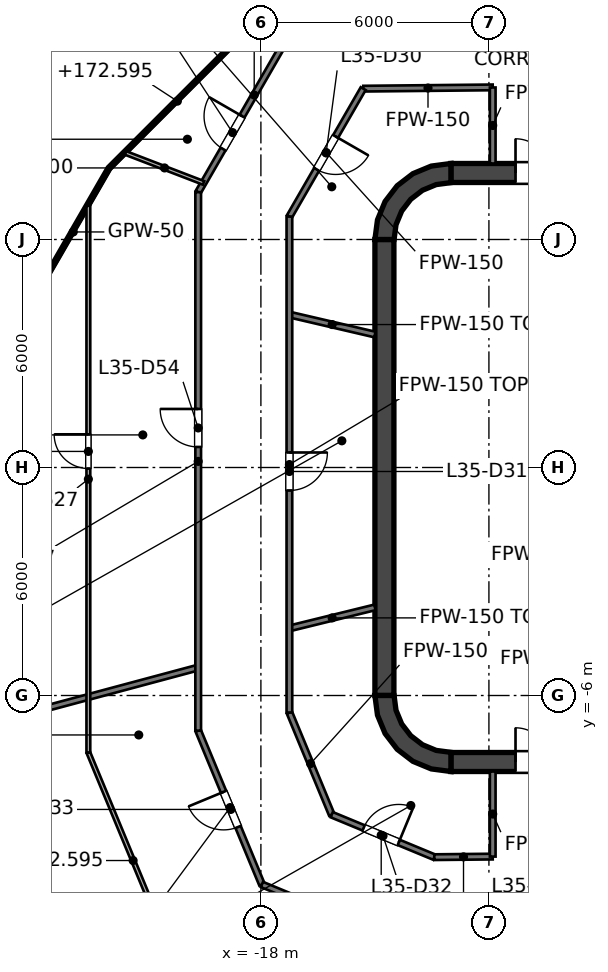
"""IFC4 building model, lengths in metres.
Left out: names, types, materials, properties, quantities, classifications, styles, units other than length and angle.
Written with IfcOpenShell. Run it as: python <this file> out.ifc"""

import sys

from ifc_helpers import new_model, si_unit, direction, frame, frame_2d, origin, place, context, subcontext, project, spatial, polyline, rectangle, outline, extrude, element, fill, save


model = new_model("IFC4")
c1 = context("Model", 3, precision=1e-05, world=origin(), true_north=direction((0.0, 1.0)))
c2 = subcontext(c1, "Body", "Model", "MODEL_VIEW")
j1 = project(units=[si_unit("LENGTHUNIT", "METRE"), si_unit("PLANEANGLEUNIT", "RADIAN")], contexts=[c1])
p1 = place(None, origin())
s1 = spatial("IfcSite", under=j1, at=p1, CompositionType="ELEMENT")
p2 = place(p1, origin())
s2 = spatial("IfcBuilding", under=s1, at=p2, CompositionType="ELEMENT")
p3 = place(p2, frame((0.0, 0.0, 169.6)))
s3 = spatial("IfcBuildingStorey", under=s2, at=p3, CompositionType="ELEMENT", Elevation=169.6)
p4 = place(p3, frame((-13.0, 7.75, 0.0), z_axis=(0.0, 0.0, 1.0), x_axis=(1.0, 0.0, 0.0)))
e1 = element("IfcWall", 1, at=p4, inside=s3, PredefinedType="SHEAR", context=c2, shape_type="SweptSolid", body=[
    extrude(rectangle(XDim=26.0, YDim=0.5, at=frame_2d((13.0, 0.0))), origin(), (0.0, 0.0, 1.0), 4.0),
])
p5 = place(p4, frame((1.7, 0.0, 0.0)))
e2 = element("IfcOpeningElement", 2, at=p5, cuts=e1, PredefinedType="OPENING", context=c2, shape_type="SweptSolid", body=[
    extrude(rectangle(XDim=1.8, YDim=2.1, at=frame_2d((0.9, 1.05))), frame((0.0, 0.25, 0.0), z_axis=(0.0, -1.0, 0.0), x_axis=(1.0, 0.0, 0.0)), (0.0, 0.0, 1.0), 0.5),
])
p6 = place(p4, frame((22.5, 0.0, 0.0)))
e3 = element("IfcOpeningElement", 3, at=p6, cuts=e1, PredefinedType="OPENING", context=c2, shape_type="SweptSolid", body=[
    extrude(rectangle(XDim=1.8, YDim=2.1, at=frame_2d((0.9, 1.05))), frame((0.0, 0.25, 0.0), z_axis=(0.0, -1.0, 0.0), x_axis=(1.0, 0.0, 0.0)), (0.0, 0.0, 1.0), 0.5),
])
p7 = place(p3, frame((-13.0, -7.75, 0.0), z_axis=(0.0, 0.0, 1.0), x_axis=(1.0, 0.0, 0.0)))
e4 = element("IfcWall", 4, at=p7, inside=s3, PredefinedType="SHEAR", context=c2, shape_type="SweptSolid", body=[
    extrude(rectangle(XDim=26.0, YDim=0.5, at=frame_2d((13.0, 0.0))), origin(), (0.0, 0.0, 1.0), 4.0),
])
p8 = place(p7, frame((1.7, 0.0, 0.0)))
e5 = element("IfcOpeningElement", 5, at=p8, cuts=e4, PredefinedType="OPENING", context=c2, shape_type="SweptSolid", body=[
    extrude(rectangle(XDim=1.8, YDim=2.1, at=frame_2d((0.9, 1.05))), frame((0.0, 0.25, 0.0), z_axis=(0.0, -1.0, 0.0), x_axis=(1.0, 0.0, 0.0)), (0.0, 0.0, 1.0), 0.5),
])
p9 = place(p7, frame((22.5, 0.0, 0.0)))
e6 = element("IfcOpeningElement", 6, at=p9, cuts=e4, PredefinedType="OPENING", context=c2, shape_type="SweptSolid", body=[
    extrude(rectangle(XDim=1.8, YDim=2.1, at=frame_2d((0.9, 1.05))), frame((0.0, 0.25, 0.0), z_axis=(0.0, -1.0, 0.0), x_axis=(1.0, 0.0, 0.0)), (0.0, 0.0, 1.0), 0.5),
])
p10 = place(p3, frame((-14.75, -6.0, 0.0), z_axis=(0.0, 0.0, 1.0), x_axis=(0.0, 1.0, 0.0)))
e7 = element("IfcWall", 7, at=p10, inside=s3, PredefinedType="SHEAR", context=c2, shape_type="SweptSolid", body=[
    extrude(rectangle(XDim=12.0, YDim=0.5, at=frame_2d((6.0, 0.0))), origin(), (0.0, 0.0, 1.0), 4.0),
])
p11 = place(p3, origin())
e8 = element("IfcWall", 8, at=p11, inside=s3, PredefinedType="SHEAR", context=c2, shape_type="SweptSolid", body=[
    extrude(outline(polyline([(-15.0, 6.0), (-14.496, 6.0), (-14.445, 6.387), (-14.295, 6.748), (-14.058, 7.058), (-13.748, 7.295), (-13.387, 7.445), (-13.0, 7.496), (-13.0, 8.0), (-13.518, 7.932), (-14.0, 7.732), (-14.414, 7.414), (-14.732, 7.0), (-14.932, 6.518), (-15.0, 6.0)])), origin(), (0.0, 0.0, 1.0), 4.0),
])
e9 = element("IfcWall", 9, at=p11, inside=s3, PredefinedType="SHEAR", context=c2, shape_type="SweptSolid", body=[
    extrude(outline(polyline([(-13.0, -8.0), (-13.0, -7.496), (-13.387, -7.445), (-13.748, -7.295), (-14.058, -7.058), (-14.295, -6.748), (-14.445, -6.387), (-14.496, -6.0), (-15.0, -6.0), (-14.932, -6.518), (-14.732, -7.0), (-14.414, -7.414), (-14.0, -7.732), (-13.518, -7.932), (-13.0, -8.0)])), origin(), (0.0, 0.0, 1.0), 4.0),
])
p12 = place(p3, frame((-11.8, -7.5, 0.0), z_axis=(0.0, 0.0, 1.0), x_axis=(0.0, 1.0, 0.0)))
e10 = element("IfcWall", 10, at=p12, inside=s3, PredefinedType="SOLIDWALL", context=c2, shape_type="SweptSolid", body=[
    extrude(rectangle(XDim=15.0, YDim=0.4, at=frame_2d((7.5, 0.0))), origin(), (0.0, 0.0, 1.0), 3.85),
])
p13 = place(p12, frame((11.3, 0.0, 0.0)))
e11 = element("IfcOpeningElement", 11, at=p13, cuts=e10, PredefinedType="OPENING", context=c2, shape_type="SweptSolid", body=[
    extrude(rectangle(XDim=1.1, YDim=2.1, at=frame_2d((0.55, 1.05))), frame((0.0, 0.2, 0.0), z_axis=(0.0, -1.0, 0.0), x_axis=(1.0, 0.0, 0.0)), (0.0, 0.0, 1.0), 0.4),
])
p14 = place(p12, frame((8.4, 0.0, 0.0)))
e12 = element("IfcOpeningElement", 12, at=p14, cuts=e10, PredefinedType="OPENING", context=c2, shape_type="SweptSolid", body=[
    extrude(rectangle(XDim=1.1, YDim=2.1, at=frame_2d((0.55, 1.05))), frame((0.0, 0.2, 0.0), z_axis=(0.0, -1.0, 0.0), x_axis=(1.0, 0.0, 0.0)), (0.0, 0.0, 1.0), 0.4),
])
p15 = place(p12, frame((5.5, 0.0, 0.0)))
e13 = element("IfcOpeningElement", 13, at=p15, cuts=e10, PredefinedType="OPENING", context=c2, shape_type="SweptSolid", body=[
    extrude(rectangle(XDim=1.1, YDim=2.1, at=frame_2d((0.55, 1.05))), frame((0.0, 0.2, 0.0), z_axis=(0.0, -1.0, 0.0), x_axis=(1.0, 0.0, 0.0)), (0.0, 0.0, 1.0), 0.4),
])
p16 = place(p12, frame((13.697, 0.0, 0.0)))
e14 = element("IfcOpeningElement", 14, at=p16, cuts=e10, PredefinedType="OPENING", context=c2, shape_type="SweptSolid", body=[
    extrude(rectangle(XDim=0.9, YDim=2.1, at=frame_2d((0.45, 1.05))), frame((0.0, 0.2, 0.0), z_axis=(0.0, -1.0, 0.0), x_axis=(1.0, 0.0, 0.0)), (0.0, 0.0, 1.0), 0.4),
])
p17 = place(p12, frame((0.403, 0.0, 0.0)))
e15 = element("IfcOpeningElement", 15, at=p17, cuts=e10, PredefinedType="OPENING", context=c2, shape_type="SweptSolid", body=[
    extrude(rectangle(XDim=0.9, YDim=2.1, at=frame_2d((0.45, 1.05))), frame((0.0, 0.2, 0.0), z_axis=(0.0, -1.0, 0.0), x_axis=(1.0, 0.0, 0.0)), (0.0, 0.0, 1.0), 0.4),
])
e16 = element("IfcWall", 16, at=p11, inside=s3, PredefinedType="SOLIDWALL", context=c2, shape_type="SweptSolid", body=[
    extrude(outline(polyline([(-12.0, -5.925), (-12.0, -5.675), (-14.25, -5.675), (-14.25, -3.025), (-12.0, -3.025), (-12.0, -2.775), (-14.25, -2.775), (-14.25, -0.125), (-12.0, -0.125), (-12.0, 0.125), (-14.25, 0.125), (-14.25, 2.775), (-12.0, 2.775), (-12.0, 3.025), (-14.25, 3.025), (-14.25, 5.675), (-12.0, 5.675), (-12.0, 5.925), (-14.25, 5.925), (-14.5, 5.925), (-14.5, 5.675), (-14.5, 3.025), (-14.5, 2.775), (-14.5, 0.125), (-14.5, -0.125), (-14.5, -2.775), (-14.5, -3.025), (-14.5, -5.675), (-14.5, -5.925), (-14.25, -5.925), (-12.0, -5.925)])), origin(), (0.0, 0.0, 1.0), 3.85),
])
p18 = place(p3, frame((-19.65, -6.925, 0.0), z_axis=(0.0, 0.0, 1.0), x_axis=(0.38279467838, -0.923833445056, 0.0)))
e17 = element("IfcWall", 17, at=p18, inside=s3, PredefinedType="PARTITIONING", context=c2, shape_type="SweptSolid", body=[
    extrude(rectangle(XDim=4.382, YDim=0.15, at=frame_2d((2.191, 0.0))), origin(), (0.0, 0.0, 1.0), 2.995),
])
p19 = place(p18, frame((1.744, 0.0, 0.0)))
e18 = element("IfcOpeningElement", 18, at=p19, cuts=e17, PredefinedType="OPENING", context=c2, shape_type="SweptSolid", body=[
    extrude(rectangle(XDim=1.0, YDim=2.1, at=frame_2d((0.5, 1.05))), frame((0.0, 0.075, 0.0), z_axis=(0.0, -1.0, 0.0), x_axis=(1.0, 0.0, 0.0)), (0.0, 0.0, 1.0), 0.15),
])
p20 = place(p3, frame((-17.25, -6.448, 0.0), z_axis=(0.0, 0.0, 1.0), x_axis=(0.382791482122, -0.923834769434, 0.0)))
e19 = element("IfcWall", 19, at=p20, inside=s3, PredefinedType="PARTITIONING", context=c2, shape_type="SweptSolid", body=[
    extrude(rectangle(XDim=2.91, YDim=0.15, at=frame_2d((1.455, 0.0))), origin(), (0.0, 0.0, 1.0), 2.995),
])
p21 = place(p3, frame((-17.973, -10.973, 0.0), z_axis=(0.0, 0.0, 1.0), x_axis=(0.923858763081, -0.382733570356, 0.0)))
e20 = element("IfcWall", 20, at=p21, inside=s3, PredefinedType="PARTITIONING", context=c2, shape_type="SweptSolid", body=[
    extrude(rectangle(XDim=4.405, YDim=0.15, at=frame_2d((2.203, 0.0))), origin(), (0.0, 0.0, 1.0), 2.995),
])
p22 = place(p3, frame((-16.136, -9.136, 0.0), z_axis=(0.0, 0.0, 1.0), x_axis=(0.923883401113, -0.3826740926, 0.0)))
e21 = element("IfcWall", 21, at=p22, inside=s3, PredefinedType="PARTITIONING", context=c2, shape_type="SweptSolid", body=[
    extrude(rectangle(XDim=2.921, YDim=0.15, at=frame_2d((1.461, 0.0))), origin(), (0.0, 0.0, 1.0), 2.995),
])
p23 = place(p22, frame((0.909, 0.0, 0.0)))
e22 = element("IfcOpeningElement", 22, at=p23, cuts=e21, PredefinedType="OPENING", context=c2, shape_type="SweptSolid", body=[
    extrude(rectangle(XDim=1.0, YDim=2.1, at=frame_2d((0.5, 1.05))), frame((0.0, 0.075, 0.0), z_axis=(0.0, -1.0, 0.0), x_axis=(1.0, 0.0, 0.0)), (0.0, 0.0, 1.0), 0.15),
])
p24 = place(p3, frame((-17.25, 4.024, 0.0), z_axis=(0.0, 0.0, 1.0), x_axis=(0.973873936825, -0.227089311007, 0.0)))
e23 = element("IfcWall", 23, at=p24, inside=s3, PredefinedType="PARTITIONING", context=c2, shape_type="SweptSolid", body=[
    extrude(rectangle(XDim=2.31, YDim=0.15, at=frame_2d((1.155, 0.0))), origin(), (0.0, 0.0, 1.0), 2.927),
])
p25 = place(p3, frame((-13.437, -10.254, 0.0), z_axis=(0.0, 0.0, 1.0), x_axis=(0.999951516679, 0.009847044796, 0.0)))
e24 = element("IfcWall", 24, at=p25, inside=s3, PredefinedType="PARTITIONING", context=c2, shape_type="SweptSolid", body=[
    extrude(rectangle(XDim=1.537, YDim=0.15, at=frame_2d((0.769, 0.0))), origin(), (0.0, 0.0, 1.0), 3.85),
])
p26 = place(p3, frame((-15.306, 9.969, 0.0), z_axis=(0.0, 0.0, 1.0), x_axis=(0.999951080092, 0.009891280127, 0.0)))
e25 = element("IfcWall", 25, at=p26, inside=s3, PredefinedType="PARTITIONING", context=c2, shape_type="SweptSolid", body=[
    extrude(rectangle(XDim=3.406, YDim=0.15, at=frame_2d((1.703, 0.0))), origin(), (0.0, 0.0, 1.0), 2.995),
])
p27 = place(p3, frame((-17.25, -4.234, 0.0), z_axis=(0.0, 0.0, 1.0), x_axis=(0.971126143966, 0.238566578769, 0.0)))
e26 = element("IfcWall", 26, at=p27, inside=s3, PredefinedType="PARTITIONING", context=c2, shape_type="SweptSolid", body=[
    extrude(rectangle(XDim=2.317, YDim=0.15, at=frame_2d((1.158, 0.0))), origin(), (0.0, 0.0, 1.0), 2.927),
])
p28 = place(p3, frame((-29.463, -7.895, 0.0), z_axis=(0.0, 0.0, 1.0), x_axis=(0.965899878732, 0.258915863296, 0.0)))
e27 = element("IfcWall", 27, at=p28, inside=s3, PredefinedType="PARTITIONING", context=c2, shape_type="SweptSolid", body=[
    extrude(rectangle(XDim=10.159, YDim=0.15, at=frame_2d((5.08, 0.0))), origin(), (0.0, 0.0, 1.0), 3.527),
])
p29 = place(p3, frame((-17.25, 6.603, 0.0), z_axis=(0.0, 0.0, 1.0), x_axis=(0.499659014053, 0.866222182627, 0.0)))
e28 = element("IfcWall", 28, at=p29, inside=s3, PredefinedType="PARTITIONING", context=c2, shape_type="SweptSolid", body=[
    extrude(rectangle(XDim=3.887, YDim=0.15, at=frame_2d((1.943, 0.0))), origin(), (0.0, 0.0, 1.0), 2.995),
])
p30 = place(p29, frame((1.434, 0.0, 0.0)))
e29 = element("IfcOpeningElement", 29, at=p30, cuts=e28, PredefinedType="OPENING", context=c2, shape_type="SweptSolid", body=[
    extrude(rectangle(XDim=1.0, YDim=2.1, at=frame_2d((0.5, 1.05))), frame((0.0, 0.075, 0.0), z_axis=(0.0, -1.0, 0.0), x_axis=(1.0, 0.0, 0.0)), (0.0, 0.0, 1.0), 0.15),
])
p31 = place(p3, frame((-19.65, 7.246, 0.0), z_axis=(0.0, 0.0, 1.0), x_axis=(0.499673489744, 0.866213832519, 0.0)))
e30 = element("IfcWall", 30, at=p31, inside=s3, PredefinedType="PARTITIONING", context=c2, shape_type="SweptSolid", body=[
    extrude(rectangle(XDim=5.899, YDim=0.15, at=frame_2d((2.95, 0.0))), origin(), (0.0, 0.0, 1.0), 2.995),
])
p32 = place(p31, frame((1.31, 0.0, 0.0)))
e31 = element("IfcOpeningElement", 31, at=p32, cuts=e30, PredefinedType="OPENING", context=c2, shape_type="SweptSolid", body=[
    extrude(rectangle(XDim=1.0, YDim=2.1, at=frame_2d((0.5, 1.05))), frame((0.0, 0.075, 0.0), z_axis=(0.0, -1.0, 0.0), x_axis=(1.0, 0.0, 0.0)), (0.0, 0.0, 1.0), 0.15),
])
p33 = place(p3, frame((-11.9, -10.239, 0.0), z_axis=(0.0, 0.0, 1.0), x_axis=(0.0, 1.0, 0.0)))
e32 = element("IfcWall", 32, at=p33, inside=s3, PredefinedType="PARTITIONING", context=c2, shape_type="SweptSolid", body=[
    extrude(rectangle(XDim=2.239, YDim=0.15, at=frame_2d((1.12, 0.0))), origin(), (0.0, 0.0, 1.0), 2.995),
])
p34 = place(p3, frame((-11.9, 8.0, 0.0), z_axis=(0.0, 0.0, 1.0), x_axis=(0.0, 1.0, 0.0)))
e33 = element("IfcWall", 33, at=p34, inside=s3, PredefinedType="PARTITIONING", context=c2, shape_type="SweptSolid", body=[
    extrude(rectangle(XDim=2.0, YDim=0.15, at=frame_2d((1.0, 0.0))), origin(), (0.0, 0.0, 1.0), 2.995),
])
p35 = place(p3, frame((-17.25, -6.448, 0.0), z_axis=(0.0, 0.0, 1.0), x_axis=(0.0, 1.0, 0.0)))
e34 = element("IfcWall", 34, at=p35, inside=s3, PredefinedType="PARTITIONING", context=c2, shape_type="SweptSolid", body=[
    extrude(rectangle(XDim=13.051, YDim=0.15, at=frame_2d((6.525, 0.0))), origin(), (0.0, 0.0, 1.0), 2.927),
])
p36 = place(p35, frame((5.843, 0.0, 0.0)))
e35 = element("IfcOpeningElement", 35, at=p36, cuts=e34, PredefinedType="OPENING", context=c2, shape_type="SweptSolid", body=[
    extrude(rectangle(XDim=1.0, YDim=2.1, at=frame_2d((0.5, 1.05))), frame((0.0, 0.075, 0.0), z_axis=(0.0, -1.0, 0.0), x_axis=(1.0, 0.0, 0.0)), (0.0, 0.0, 1.0), 0.15),
])
p37 = place(p3, frame((-19.65, -6.925, 0.0), z_axis=(0.0, 0.0, 1.0), x_axis=(0.0, 1.0, 0.0)))
e36 = element("IfcWall", 36, at=p37, inside=s3, PredefinedType="PARTITIONING", context=c2, shape_type="SweptSolid", body=[
    extrude(rectangle(XDim=14.171, YDim=0.15, at=frame_2d((7.085, 0.0))), origin(), (0.0, 0.0, 1.0), 2.927),
])
p38 = place(p37, frame((7.466, 0.0, 0.0)))
e37 = element("IfcOpeningElement", 37, at=p38, cuts=e36, PredefinedType="OPENING", context=c2, shape_type="SweptSolid", body=[
    extrude(rectangle(XDim=1.0, YDim=2.1, at=frame_2d((0.5, 1.05))), frame((0.0, 0.075, 0.0), z_axis=(0.0, -1.0, 0.0), x_axis=(1.0, 0.0, 0.0)), (0.0, 0.0, 1.0), 0.15),
])
p39 = place(p3, frame((-21.977, 7.861, 0.0), z_axis=(0.0, 0.0, 1.0), x_axis=(0.70713104079, 0.707082520751, 0.0)))
e38 = element("IfcWall", 38, at=p39, inside=s3, PredefinedType="PARTITIONING", context=c2, shape_type="SweptSolid", body=[
    extrude(rectangle(XDim=5.032, YDim=0.05, at=frame_2d((2.516, 0.0))), origin(), (0.0, 0.0, 1.0), 2.995),
])
p40 = place(p3, frame((-23.897, 4.536, 0.0), z_axis=(0.0, 0.0, 1.0), x_axis=(0.500023335103, 0.866011930837, 0.0)))
e39 = element("IfcWall", 39, at=p40, inside=s3, PredefinedType="PARTITIONING", context=c2, shape_type="SweptSolid", body=[
    extrude(rectangle(XDim=3.84, YDim=0.05, at=frame_2d((1.92, 0.0))), origin(), (0.0, 0.0, 1.0), 2.927),
])
p41 = place(p3, frame((-22.54, -7.5, 0.0), z_axis=(0.0, 0.0, 1.0), x_axis=(0.382704529509, -0.923870793506, 0.0)))
e40 = element("IfcWall", 40, at=p41, inside=s3, PredefinedType="PARTITIONING", context=c2, shape_type="SweptSolid", body=[
    extrude(rectangle(XDim=6.154, YDim=0.1, at=frame_2d((3.077, 0.0))), origin(), (0.0, 0.0, 1.0), 2.995),
])
p42 = place(p3, frame((-21.561, 8.277, 0.0), z_axis=(0.0, 0.0, 1.0), x_axis=(0.933462969835, -0.358673784862, 0.0)))
e41 = element("IfcWall", 41, at=p42, inside=s3, PredefinedType="PARTITIONING", context=c2, shape_type="SweptSolid", body=[
    extrude(rectangle(XDim=2.197, YDim=0.1, at=frame_2d((1.099, 0.0))), origin(), (0.0, 0.0, 1.0), 3.85),
])
p43 = place(p3, frame((-22.54, -7.5, 0.0), z_axis=(0.0, 0.0, 1.0), x_axis=(0.0, 1.0, 0.0)))
e42 = element("IfcWall", 42, at=p43, inside=s3, PredefinedType="PARTITIONING", context=c2, shape_type="SweptSolid", body=[
    extrude(rectangle(XDim=14.386, YDim=0.1, at=frame_2d((7.193, 0.0))), origin(), (0.0, 0.0, 1.0), 2.927),
])
p44 = place(p43, frame((7.473, 0.0, 0.0)))
e43 = element("IfcOpeningElement", 43, at=p44, cuts=e42, PredefinedType="OPENING", context=c2, shape_type="SweptSolid", body=[
    extrude(rectangle(XDim=0.9, YDim=2.1, at=frame_2d((0.45, 1.05))), frame((0.0, 0.05, 0.0), z_axis=(0.0, -1.0, 0.0), x_axis=(1.0, 0.0, 0.0)), (0.0, 0.0, 1.0), 0.1),
])
p45 = place(p13, origin())
e44 = element("IfcDoor", 44, at=p45, inside=s3, OperationType="DOUBLE_DOOR_SLIDING", PredefinedType="DOOR", context=c2, shape_type="SweptSolid", body=[
    extrude(rectangle(XDim=1.1, YDim=2.1, at=frame_2d((0.55, 1.05))), frame((0.0, 0.025, 0.0), z_axis=(0.0, -1.0, 0.0), x_axis=(1.0, 0.0, 0.0)), (0.0, 0.0, 1.0), 0.05),
])
fill(e11, e44)
p46 = place(p14, origin())
e45 = element("IfcDoor", 45, at=p46, inside=s3, OperationType="DOUBLE_DOOR_SLIDING", PredefinedType="DOOR", context=c2, shape_type="SweptSolid", body=[
    extrude(rectangle(XDim=1.1, YDim=2.1, at=frame_2d((0.55, 1.05))), frame((0.0, 0.025, 0.0), z_axis=(0.0, -1.0, 0.0), x_axis=(1.0, 0.0, 0.0)), (0.0, 0.0, 1.0), 0.05),
])
fill(e12, e45)
p47 = place(p15, origin())
e46 = element("IfcDoor", 46, at=p47, inside=s3, OperationType="DOUBLE_DOOR_SLIDING", PredefinedType="DOOR", context=c2, shape_type="SweptSolid", body=[
    extrude(rectangle(XDim=1.1, YDim=2.1, at=frame_2d((0.55, 1.05))), frame((0.0, 0.025, 0.0), z_axis=(0.0, -1.0, 0.0), x_axis=(1.0, 0.0, 0.0)), (0.0, 0.0, 1.0), 0.05),
])
fill(e13, e46)
p48 = place(p16, origin())
e47 = element("IfcDoor", 47, at=p48, inside=s3, OperationType="SINGLE_SWING_LEFT", PredefinedType="DOOR", context=c2, shape_type="SweptSolid", body=[
    extrude(rectangle(XDim=0.9, YDim=2.1, at=frame_2d((0.45, 1.05))), frame((0.0, 0.025, 0.0), z_axis=(0.0, -1.0, 0.0), x_axis=(1.0, 0.0, 0.0)), (0.0, 0.0, 1.0), 0.05),
])
fill(e14, e47)
p49 = place(p17, origin())
e48 = element("IfcDoor", 48, at=p49, inside=s3, OperationType="SINGLE_SWING_LEFT", PredefinedType="DOOR", context=c2, shape_type="SweptSolid", body=[
    extrude(rectangle(XDim=0.9, YDim=2.1, at=frame_2d((0.45, 1.05))), frame((0.0, 0.025, 0.0), z_axis=(0.0, -1.0, 0.0), x_axis=(1.0, 0.0, 0.0)), (0.0, 0.0, 1.0), 0.05),
])
fill(e15, e48)
p50 = place(p5, origin())
e49 = element("IfcDoor", 49, at=p50, inside=s3, OperationType="DOUBLE_DOOR_SINGLE_SWING", PredefinedType="DOOR", context=c2, shape_type="SweptSolid", body=[
    extrude(rectangle(XDim=1.8, YDim=2.1, at=frame_2d((0.9, 1.05))), frame((0.0, 0.025, 0.0), z_axis=(0.0, -1.0, 0.0), x_axis=(1.0, 0.0, 0.0)), (0.0, 0.0, 1.0), 0.05),
])
fill(e2, e49)
p51 = place(p8, origin())
e50 = element("IfcDoor", 50, at=p51, inside=s3, OperationType="DOUBLE_DOOR_SINGLE_SWING", PredefinedType="DOOR", context=c2, shape_type="SweptSolid", body=[
    extrude(rectangle(XDim=1.8, YDim=2.1, at=frame_2d((0.9, 1.05))), frame((0.0, 0.025, 0.0), z_axis=(0.0, -1.0, 0.0), x_axis=(1.0, 0.0, 0.0)), (0.0, 0.0, 1.0), 0.05),
])
fill(e5, e50)
p52 = place(p30, origin())
e51 = element("IfcDoor", 51, at=p52, inside=s3, OperationType="SINGLE_SWING_RIGHT", PredefinedType="DOOR", context=c2, shape_type="SweptSolid", body=[
    extrude(rectangle(XDim=1.0, YDim=2.1, at=frame_2d((0.5, 1.05))), frame((0.0, 0.025, 0.0), z_axis=(0.0, -1.0, 0.0), x_axis=(1.0, 0.0, 0.0)), (0.0, 0.0, 1.0), 0.05),
])
fill(e29, e51)
p53 = place(p36, origin())
e52 = element("IfcDoor", 52, at=p53, inside=s3, OperationType="SINGLE_SWING_RIGHT", PredefinedType="DOOR", context=c2, shape_type="SweptSolid", body=[
    extrude(rectangle(XDim=1.0, YDim=2.1, at=frame_2d((0.5, 1.05))), frame((0.0, 0.025, 0.0), z_axis=(0.0, -1.0, 0.0), x_axis=(1.0, 0.0, 0.0)), (0.0, 0.0, 1.0), 0.05),
])
fill(e35, e52)
p54 = place(p23, origin())
e53 = element("IfcDoor", 53, at=p54, inside=s3, OperationType="SINGLE_SWING_RIGHT", PredefinedType="DOOR", context=c2, shape_type="SweptSolid", body=[
    extrude(rectangle(XDim=1.0, YDim=2.1, at=frame_2d((0.5, 1.05))), frame((0.0, 0.025, 0.0), z_axis=(0.0, -1.0, 0.0), x_axis=(1.0, 0.0, 0.0)), (0.0, 0.0, 1.0), 0.05),
])
fill(e22, e53)
p55 = place(p19, origin())
e54 = element("IfcDoor", 54, at=p55, inside=s3, OperationType="SINGLE_SWING_LEFT", PredefinedType="DOOR", context=c2, shape_type="SweptSolid", body=[
    extrude(rectangle(XDim=1.0, YDim=2.1, at=frame_2d((0.5, 1.05))), frame((0.0, 0.025, 0.0), z_axis=(0.0, -1.0, 0.0), x_axis=(1.0, 0.0, 0.0)), (0.0, 0.0, 1.0), 0.05),
])
fill(e18, e54)
p56 = place(p32, origin())
e55 = element("IfcDoor", 55, at=p56, inside=s3, OperationType="SINGLE_SWING_RIGHT", PredefinedType="DOOR", context=c2, shape_type="SweptSolid", body=[
    extrude(rectangle(XDim=1.0, YDim=2.1, at=frame_2d((0.5, 1.05))), frame((0.0, 0.025, 0.0), z_axis=(0.0, -1.0, 0.0), x_axis=(1.0, 0.0, 0.0)), (0.0, 0.0, 1.0), 0.05),
])
fill(e31, e55)
p57 = place(p38, origin())
e56 = element("IfcDoor", 56, at=p57, inside=s3, OperationType="SINGLE_SWING_RIGHT", PredefinedType="DOOR", context=c2, shape_type="SweptSolid", body=[
    extrude(rectangle(XDim=1.0, YDim=2.1, at=frame_2d((0.5, 1.05))), frame((0.0, 0.025, 0.0), z_axis=(0.0, -1.0, 0.0), x_axis=(1.0, 0.0, 0.0)), (0.0, 0.0, 1.0), 0.05),
])
fill(e37, e56)
p58 = place(p44, origin())
e57 = element("IfcDoor", 57, at=p58, inside=s3, OperationType="SINGLE_SWING_RIGHT", PredefinedType="DOOR", context=c2, shape_type="SweptSolid", body=[
    extrude(rectangle(XDim=0.9, YDim=2.1, at=frame_2d((0.45, 1.05))), frame((0.0, 0.025, 0.0), z_axis=(0.0, -1.0, 0.0), x_axis=(1.0, 0.0, 0.0)), (0.0, 0.0, 1.0), 0.05),
])
fill(e43, e57)
save(model, sys.argv[1])
